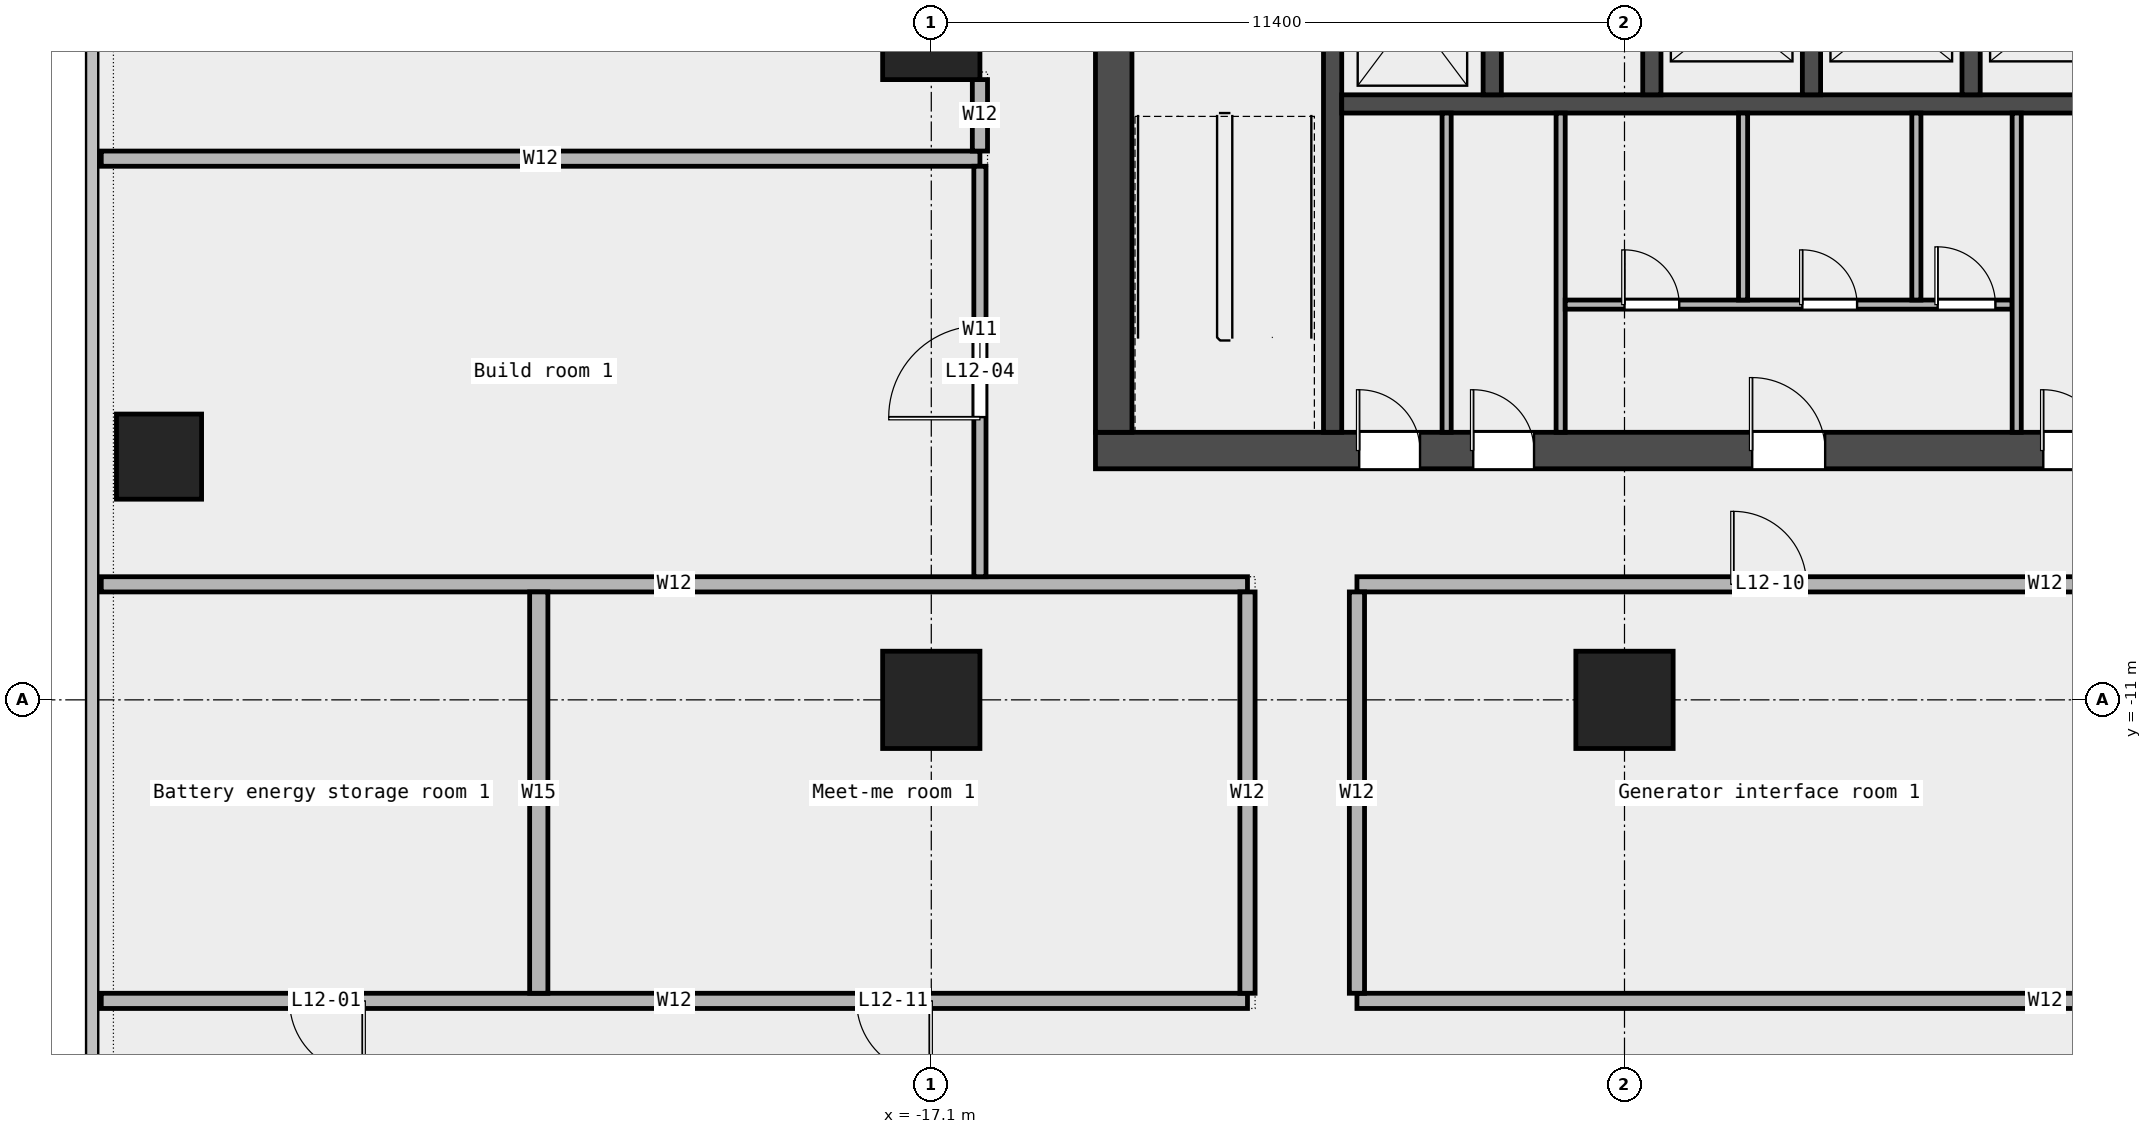
"""IFC4 building model, lengths in metres.
Left out: names, types, materials, properties, quantities, classifications, styles, units other than length and angle.
Written with IfcOpenShell. Run it as: python <this file> out.ifc"""

import sys

from ifc_helpers import new_model, si_unit, direction, frame, frame_2d, origin, origin_2d, place, context, subcontext, project, spatial, rectangle, extrude, element, fill, save


model = new_model("IFC4")
c1 = context("Model", 3, precision=1e-05, world=origin(), true_north=direction((0.0, 1.0)))
c2 = subcontext(c1, "Body", "Model", "MODEL_VIEW")
j1 = project(units=[si_unit("LENGTHUNIT", "METRE"), si_unit("PLANEANGLEUNIT", "RADIAN")], contexts=[c1])
p1 = place(None, origin())
s1 = spatial("IfcSite", under=j1, at=p1, CompositionType="ELEMENT")
p2 = place(p1, origin())
s2 = spatial("IfcBuilding", under=s1, at=p2, CompositionType="ELEMENT")
p3 = place(p2, frame((0.0, 0.0, 64.6)))
s3 = spatial("IfcBuildingStorey", under=s2, at=p3, CompositionType="ELEMENT", Elevation=64.6)
p4 = place(p3, frame((-29.8, -7.0, 0.0), z_axis=(0.0, 0.0, 1.0), x_axis=(1.0, 0.0, 0.0)))
e1 = element("IfcColumn", 1, at=p4, inside=s3, PredefinedType="COLUMN", context=c2, shape_type="SweptSolid", body=[
    extrude(rectangle(XDim=1.4, YDim=1.4, at=origin_2d()), origin(), (0.0, 0.0, 1.0), 4.35),
])
for number, where, z_axis, x_axis in (
    (2, (-17.1, -11.0, 0.0), (0.0, 0.0, 1.0), (1.0, 0.0, 0.0)),
    (3, (-17.1, 0.0, 0.0), (0.0, 0.0, 1.0), (1.0, 0.0, 0.0)),
    (4, (-5.7, -11.0, 0.0), (0.0, 0.0, 1.0), (1.0, 0.0, 0.0)),
):
    element("IfcColumn", number, at=place(p3, frame(where, z_axis=z_axis, x_axis=x_axis)), inside=s3, PredefinedType="COLUMN", context=c2, shape_type="SweptSolid", body=[
        extrude(rectangle(XDim=1.6, YDim=1.6, at=origin_2d()), origin(), (0.0, 0.0, 1.0), 4.35),
    ])
p5 = place(p3, frame((-30.75, -15.95, 0.0), z_axis=(0.0, 0.0, 1.0), x_axis=(1.0, 0.0, 0.0)))
e5 = element("IfcWall", 5, at=p5, inside=s3, PredefinedType="PARTITIONING", context=c2, shape_type="SweptSolid", body=[
    extrude(rectangle(XDim=18.85, YDim=0.25, at=frame_2d((9.425, 0.0))), origin(), (0.0, 0.0, 1.0), 4.35),
])
p6 = place(p5, frame((3.097, 0.0, 0.0)))
e6 = element("IfcOpeningElement", 6, at=p6, cuts=e5, PredefinedType="OPENING", context=c2, shape_type="SweptSolid", body=[
    extrude(rectangle(XDim=1.2, YDim=2.1, at=frame_2d((0.6, 1.05))), frame((0.0, 0.137, 0.0), z_axis=(0.0, -1.0, 0.0), x_axis=(1.0, 0.0, 0.0)), (0.0, 0.0, 1.0), 0.274),
])
p7 = place(p5, frame((12.423, 0.0, 0.0)))
e7 = element("IfcOpeningElement", 7, at=p7, cuts=e5, PredefinedType="OPENING", context=c2, shape_type="SweptSolid", body=[
    extrude(rectangle(XDim=1.2, YDim=2.1, at=frame_2d((0.6, 1.05))), frame((0.0, 0.137, 0.0), z_axis=(0.0, -1.0, 0.0), x_axis=(1.0, 0.0, 0.0)), (0.0, 0.0, 1.0), 0.274),
])
p8 = place(p3, frame((-10.1, -15.95, 0.0), z_axis=(0.0, 0.0, 1.0), x_axis=(1.0, 0.0, 0.0)))
e8 = element("IfcWall", 8, at=p8, inside=s3, PredefinedType="PARTITIONING", context=c2, shape_type="SweptSolid", body=[
    extrude(rectangle(XDim=22.64, YDim=0.25, at=frame_2d((11.32, 0.0))), origin(), (0.0, 0.0, 1.0), 4.35),
])
p9 = place(p3, frame((-30.75, -9.1, 0.0), z_axis=(0.0, 0.0, 1.0), x_axis=(1.0, 0.0, 0.0)))
e9 = element("IfcWall", 9, at=p9, inside=s3, PredefinedType="PARTITIONING", context=c2, shape_type="SweptSolid", body=[
    extrude(rectangle(XDim=18.85, YDim=0.25, at=frame_2d((9.425, 0.0))), origin(), (0.0, 0.0, 1.0), 4.35),
])
p10 = place(p3, frame((-10.1, -9.1, 0.0), z_axis=(0.0, 0.0, 1.0), x_axis=(1.0, 0.0, 0.0)))
e10 = element("IfcWall", 10, at=p10, inside=s3, PredefinedType="PARTITIONING", context=c2, shape_type="SweptSolid", body=[
    extrude(rectangle(XDim=22.64, YDim=0.25, at=frame_2d((11.32, 0.0))), origin(), (0.0, 0.0, 1.0), 4.35),
])
p11 = place(p10, frame((17.512, 0.0, 0.0)))
e11 = element("IfcOpeningElement", 11, at=p11, cuts=e10, PredefinedType="OPENING", context=c2, shape_type="SweptSolid", body=[
    extrude(rectangle(XDim=1.2, YDim=2.1, at=frame_2d((0.6, 1.05))), frame((0.0, 0.137, 0.0), z_axis=(0.0, -1.0, 0.0), x_axis=(1.0, 0.0, 0.0)), (0.0, 0.0, 1.0), 0.274),
])
p12 = place(p10, frame((6.192, 0.0, 0.0)))
e12 = element("IfcOpeningElement", 12, at=p12, cuts=e10, PredefinedType="OPENING", context=c2, shape_type="SweptSolid", body=[
    extrude(rectangle(XDim=1.2, YDim=2.1, at=frame_2d((0.6, 1.05))), frame((0.0, 0.137, 0.0), z_axis=(0.0, -1.0, 0.0), x_axis=(1.0, 0.0, 0.0)), (0.0, 0.0, 1.0), 0.274),
])
p13 = place(p3, frame((-30.75, -2.1, 0.0), z_axis=(0.0, 0.0, 1.0), x_axis=(1.0, 0.0, 0.0)))
e13 = element("IfcWall", 13, at=p13, inside=s3, PredefinedType="PARTITIONING", context=c2, shape_type="SweptSolid", body=[
    extrude(rectangle(XDim=14.45, YDim=0.25, at=frame_2d((7.225, 0.0))), origin(), (0.0, 0.0, 1.0), 4.35),
])
p14 = place(p3, frame((-23.555, -15.825, 0.0), z_axis=(0.0, 0.0, 1.0), x_axis=(0.0, 1.0, 0.0)))
e14 = element("IfcWall", 14, at=p14, inside=s3, PredefinedType="PARTITIONING", context=c2, shape_type="SweptSolid", body=[
    extrude(rectangle(XDim=6.6, YDim=0.3, at=frame_2d((3.3, 0.0))), origin(), (0.0, 0.0, 1.0), 4.35),
])
p15 = place(p3, frame((-16.3, -8.975, 0.0), z_axis=(0.0, 0.0, 1.0), x_axis=(0.0, 1.0, 0.0)))
e15 = element("IfcWall", 15, at=p15, inside=s3, PredefinedType="PARTITIONING", context=c2, shape_type="SweptSolid", body=[
    extrude(rectangle(XDim=6.75, YDim=0.2, at=frame_2d((3.375, 0.0))), origin(), (0.0, 0.0, 1.0), 4.35),
])
p16 = place(p15, frame((2.625, 0.0, 0.0)))
e16 = element("IfcOpeningElement", 16, at=p16, cuts=e15, PredefinedType="OPENING", context=c2, shape_type="SweptSolid", body=[
    extrude(rectangle(XDim=1.5, YDim=2.1, at=frame_2d((0.75, 1.05))), frame((0.0, 0.112, 0.0), z_axis=(0.0, -1.0, 0.0), x_axis=(1.0, 0.0, 0.0)), (0.0, 0.0, 1.0), 0.224),
])
p17 = place(p3, frame((-16.3, -1.975, 0.0), z_axis=(0.0, 0.0, 1.0), x_axis=(0.0, 1.0, 0.0)))
e17 = element("IfcWall", 17, at=p17, inside=s3, PredefinedType="PARTITIONING", context=c2, shape_type="SweptSolid", body=[
    extrude(rectangle(XDim=1.175, YDim=0.25, at=frame_2d((0.587, 0.0))), origin(), (0.0, 0.0, 1.0), 4.35),
])
for number, where, z_axis, x_axis in (
    (18, (-11.9, -15.825, 0.0), (0.0, 0.0, 1.0), (0.0, 1.0, 0.0)),
    (19, (-10.1, -15.825, 0.0), (0.0, 0.0, 1.0), (0.0, 1.0, 0.0)),
):
    element("IfcWall", number, at=place(p3, frame(where, z_axis=z_axis, x_axis=x_axis)), inside=s3, PredefinedType="PARTITIONING", context=c2, shape_type="SweptSolid", body=[
        extrude(rectangle(XDim=6.6, YDim=0.25, at=frame_2d((3.3, 0.0))), origin(), (0.0, 0.0, 1.0), 4.35),
    ])
p18 = place(p3, frame((-14.4, -6.9, 0.0), z_axis=(0.0, 0.0, 1.0), x_axis=(1.0, 0.0, 0.0)))
e20 = element("IfcWall", 20, at=p18, inside=s3, PredefinedType="SHEAR", context=c2, shape_type="SweptSolid", body=[
    extrude(rectangle(XDim=28.8, YDim=0.6, at=frame_2d((14.4, 0.0))), origin(), (0.0, 0.0, 1.0), 4.5),
])
p19 = place(p18, frame((4.337, 0.0, 0.0)))
e21 = element("IfcOpeningElement", 21, at=p19, cuts=e20, PredefinedType="OPENING", context=c2, shape_type="SweptSolid", body=[
    extrude(rectangle(XDim=1.0, YDim=2.1, at=frame_2d((0.5, 1.05))), frame((0.0, 0.312, 0.0), z_axis=(0.0, -1.0, 0.0), x_axis=(1.0, 0.0, 0.0)), (0.0, 0.0, 1.0), 0.624),
])
p20 = place(p18, frame((6.212, 0.0, 0.0)))
e22 = element("IfcOpeningElement", 22, at=p20, cuts=e20, PredefinedType="OPENING", context=c2, shape_type="SweptSolid", body=[
    extrude(rectangle(XDim=1.0, YDim=2.1, at=frame_2d((0.5, 1.05))), frame((0.0, 0.312, 0.0), z_axis=(0.0, -1.0, 0.0), x_axis=(1.0, 0.0, 0.0)), (0.0, 0.0, 1.0), 0.624),
])
p21 = place(p18, frame((10.8, 0.0, 0.0)))
e23 = element("IfcOpeningElement", 23, at=p21, cuts=e20, PredefinedType="OPENING", context=c2, shape_type="SweptSolid", body=[
    extrude(rectangle(XDim=1.2, YDim=2.1, at=frame_2d((0.6, 1.05))), frame((0.0, 0.312, 0.0), z_axis=(0.0, -1.0, 0.0), x_axis=(1.0, 0.0, 0.0)), (0.0, 0.0, 1.0), 0.624),
])
p22 = place(p18, frame((15.587, 0.0, 0.0)))
e24 = element("IfcOpeningElement", 24, at=p22, cuts=e20, PredefinedType="OPENING", context=c2, shape_type="SweptSolid", body=[
    extrude(rectangle(XDim=1.0, YDim=2.1, at=frame_2d((0.5, 1.05))), frame((0.0, 0.312, 0.0), z_axis=(0.0, -1.0, 0.0), x_axis=(1.0, 0.0, 0.0)), (0.0, 0.0, 1.0), 0.624),
])
p23 = place(p18, frame((18.75, 0.0, 0.0)))
e25 = element("IfcOpeningElement", 25, at=p23, cuts=e20, PredefinedType="OPENING", context=c2, shape_type="SweptSolid", body=[
    extrude(rectangle(XDim=1.8, YDim=2.1, at=frame_2d((0.9, 1.05))), frame((0.0, 0.312, 0.0), z_axis=(0.0, -1.0, 0.0), x_axis=(1.0, 0.0, 0.0)), (0.0, 0.0, 1.0), 0.624),
])
p24 = place(p18, frame((23.087, 0.0, 0.0)))
e26 = element("IfcOpeningElement", 26, at=p24, cuts=e20, PredefinedType="OPENING", context=c2, shape_type="SweptSolid", body=[
    extrude(rectangle(XDim=1.0, YDim=2.1, at=frame_2d((0.5, 1.05))), frame((0.0, 0.312, 0.0), z_axis=(0.0, -1.0, 0.0), x_axis=(1.0, 0.0, 0.0)), (0.0, 0.0, 1.0), 0.624),
])
p25 = place(p3, frame((-14.1, -6.6, 0.0), z_axis=(0.0, 0.0, 1.0), x_axis=(0.0, 1.0, 0.0)))
e27 = element("IfcWall", 27, at=p25, inside=s3, PredefinedType="SHEAR", context=c2, shape_type="SweptSolid", body=[
    extrude(rectangle(XDim=19.5, YDim=0.6, at=frame_2d((9.75, 0.0))), origin(), (0.0, 0.0, 1.0), 4.5),
])
p26 = place(p25, frame((9.3, 0.0, 0.0)))
e28 = element("IfcOpeningElement", 28, at=p26, cuts=e27, PredefinedType="OPENING", context=c2, shape_type="SweptSolid", body=[
    extrude(rectangle(XDim=1.8, YDim=2.1, at=frame_2d((0.9, 1.05))), frame((0.0, 0.312, 0.0), z_axis=(0.0, -1.0, 0.0), x_axis=(1.0, 0.0, 0.0)), (0.0, 0.0, 1.0), 0.624),
])
p27 = place(p3, frame((-10.5, -6.6, 0.0), z_axis=(0.0, 0.0, 1.0), x_axis=(0.0, 1.0, 0.0)))
e29 = element("IfcWall", 29, at=p27, inside=s3, PredefinedType="SHEAR", context=c2, shape_type="SweptSolid", body=[
    extrude(rectangle(XDim=8.55, YDim=0.3, at=frame_2d((4.275, 0.0))), origin(), (0.0, 0.0, 1.0), 4.5),
])
p28 = place(p3, frame((-10.35, -1.2, 0.0), z_axis=(0.0, 0.0, 1.0), x_axis=(1.0, 0.0, 0.0)))
e30 = element("IfcWall", 30, at=p28, inside=s3, PredefinedType="SOLIDWALL", context=c2, shape_type="SweptSolid", body=[
    extrude(rectangle(XDim=20.7, YDim=0.3, at=frame_2d((10.35, 0.0))), origin(), (0.0, 0.0, 1.0), 4.5),
])
for number, where, z_axis, x_axis in (
    (31, (-7.875, -1.05, 0.0), (0.0, 0.0, 1.0), (0.0, 1.0, 0.0)),
    (32, (-5.25, -1.05, 0.0), (0.0, 0.0, 1.0), (0.0, 1.0, 0.0)),
    (33, (-2.625, -1.05, 0.0), (0.0, 0.0, 1.0), (0.0, 1.0, 0.0)),
    (34, (0.0, -1.05, 0.0), (0.0, 0.0, 1.0), (0.0, 1.0, 0.0)),
):
    element("IfcWall", number, at=place(p3, frame(where, z_axis=z_axis, x_axis=x_axis)), inside=s3, PredefinedType="SOLIDWALL", context=c2, shape_type="SweptSolid", body=[
        extrude(rectangle(XDim=2.7, YDim=0.3, at=frame_2d((1.35, 0.0))), origin(), (0.0, 0.0, 1.0), 4.5),
    ])
for number, where, z_axis, x_axis in (
    (35, (-8.625, -6.6, 0.0), (0.0, 0.0, 1.0), (0.0, 1.0, 0.0)),
    (36, (-6.75, -6.6, 0.0), (0.0, 0.0, 1.0), (0.0, 1.0, 0.0)),
):
    element("IfcWall", number, at=place(p3, frame(where, z_axis=z_axis, x_axis=x_axis)), inside=s3, PredefinedType="PARTITIONING", context=c2, shape_type="SweptSolid", body=[
        extrude(rectangle(XDim=5.25, YDim=0.15, at=frame_2d((2.625, 0.0))), origin(), (0.0, 0.0, 1.0), 4.5),
    ])
p29 = place(p3, frame((-6.675, -4.5, 0.0), z_axis=(0.0, 0.0, 1.0), x_axis=(1.0, 0.0, 0.0)))
e37 = element("IfcWall", 37, at=p29, inside=s3, PredefinedType="PARTITIONING", context=c2, shape_type="SweptSolid", body=[
    extrude(rectangle(XDim=7.35, YDim=0.15, at=frame_2d((3.675, 0.0))), origin(), (0.0, 0.0, 1.0), 4.5),
])
p30 = place(p29, frame((0.975, 0.0, 0.0)))
e38 = element("IfcOpeningElement", 38, at=p30, cuts=e37, PredefinedType="OPENING", context=c2, shape_type="SweptSolid", body=[
    extrude(rectangle(XDim=0.9, YDim=2.1, at=frame_2d((0.45, 1.05))), frame((0.0, 0.087, 0.0), z_axis=(0.0, -1.0, 0.0), x_axis=(1.0, 0.0, 0.0)), (0.0, 0.0, 1.0), 0.174),
])
p31 = place(p29, frame((3.9, 0.0, 0.0)))
e39 = element("IfcOpeningElement", 39, at=p31, cuts=e37, PredefinedType="OPENING", context=c2, shape_type="SweptSolid", body=[
    extrude(rectangle(XDim=0.9, YDim=2.1, at=frame_2d((0.45, 1.05))), frame((0.0, 0.087, 0.0), z_axis=(0.0, -1.0, 0.0), x_axis=(1.0, 0.0, 0.0)), (0.0, 0.0, 1.0), 0.174),
])
p32 = place(p29, frame((6.125, 0.0, 0.0)))
e40 = element("IfcOpeningElement", 40, at=p32, cuts=e37, PredefinedType="OPENING", context=c2, shape_type="SweptSolid", body=[
    extrude(rectangle(XDim=0.95, YDim=2.1, at=frame_2d((0.475, 1.05))), frame((0.0, 0.087, 0.0), z_axis=(0.0, -1.0, 0.0), x_axis=(1.0, 0.0, 0.0)), (0.0, 0.0, 1.0), 0.174),
])
for number, where, z_axis, x_axis in (
    (41, (-3.75, -4.425, 0.0), (0.0, 0.0, 1.0), (0.0, 1.0, 0.0)),
    (42, (-0.9, -4.425, 0.0), (0.0, 0.0, 1.0), (0.0, 1.0, 0.0)),
):
    element("IfcWall", number, at=place(p3, frame(where, z_axis=z_axis, x_axis=x_axis)), inside=s3, PredefinedType="PARTITIONING", context=c2, shape_type="SweptSolid", body=[
        extrude(rectangle(XDim=3.075, YDim=0.15, at=frame_2d((1.538, 0.0))), origin(), (0.0, 0.0, 1.0), 4.5),
    ])
p33 = place(p3, frame((0.75, -6.6, 0.0), z_axis=(0.0, 0.0, 1.0), x_axis=(0.0, 1.0, 0.0)))
e43 = element("IfcWall", 43, at=p33, inside=s3, PredefinedType="PARTITIONING", context=c2, shape_type="SweptSolid", body=[
    extrude(rectangle(XDim=5.25, YDim=0.15, at=frame_2d((2.625, 0.0))), origin(), (0.0, 0.0, 1.0), 4.5),
])
p34 = place(p6, origin())
e44 = element("IfcDoor", 44, at=p34, inside=s3, OperationType="SINGLE_SWING_LEFT", PredefinedType="DOOR", context=c2, shape_type="SweptSolid", body=[
    extrude(rectangle(XDim=1.2, YDim=2.1, at=frame_2d((0.6, 1.05))), frame((0.0, 0.025, 0.0), z_axis=(0.0, -1.0, 0.0), x_axis=(1.0, 0.0, 0.0)), (0.0, 0.0, 1.0), 0.05),
])
fill(e6, e44)
p35 = place(p16, origin())
e45 = element("IfcDoor", 45, at=p35, inside=s3, OperationType="DOUBLE_DOOR_SINGLE_SWING", PredefinedType="DOOR", context=c2, shape_type="SweptSolid", body=[
    extrude(rectangle(XDim=1.5, YDim=2.1, at=frame_2d((0.75, 1.05))), frame((0.0, 0.025, 0.0), z_axis=(0.0, -1.0, 0.0), x_axis=(1.0, 0.0, 0.0)), (0.0, 0.0, 1.0), 0.05),
])
fill(e16, e45)
p36 = place(p12, origin())
e46 = element("IfcDoor", 46, at=p36, inside=s3, OperationType="SINGLE_SWING_LEFT", PredefinedType="DOOR", context=c2, shape_type="SweptSolid", body=[
    extrude(rectangle(XDim=1.2, YDim=2.1, at=frame_2d((0.6, 1.05))), frame((0.0, 0.025, 0.0), z_axis=(0.0, -1.0, 0.0), x_axis=(1.0, 0.0, 0.0)), (0.0, 0.0, 1.0), 0.05),
])
fill(e12, e46)
p37 = place(p7, origin())
e47 = element("IfcDoor", 47, at=p37, inside=s3, OperationType="SINGLE_SWING_LEFT", PredefinedType="DOOR", context=c2, shape_type="SweptSolid", body=[
    extrude(rectangle(XDim=1.2, YDim=2.1, at=frame_2d((0.6, 1.05))), frame((0.0, 0.025, 0.0), z_axis=(0.0, -1.0, 0.0), x_axis=(1.0, 0.0, 0.0)), (0.0, 0.0, 1.0), 0.05),
])
fill(e7, e47)
p38 = place(p19, origin())
e48 = element("IfcDoor", 48, at=p38, inside=s3, OperationType="SINGLE_SWING_LEFT", PredefinedType="DOOR", context=c2, shape_type="SweptSolid", body=[
    extrude(rectangle(XDim=1.0, YDim=2.1, at=frame_2d((0.5, 1.05))), frame((0.0, 0.025, 0.0), z_axis=(0.0, -1.0, 0.0), x_axis=(1.0, 0.0, 0.0)), (0.0, 0.0, 1.0), 0.05),
])
fill(e21, e48)
p39 = place(p20, origin())
e49 = element("IfcDoor", 49, at=p39, inside=s3, OperationType="SINGLE_SWING_LEFT", PredefinedType="DOOR", context=c2, shape_type="SweptSolid", body=[
    extrude(rectangle(XDim=1.0, YDim=2.1, at=frame_2d((0.5, 1.05))), frame((0.0, 0.025, 0.0), z_axis=(0.0, -1.0, 0.0), x_axis=(1.0, 0.0, 0.0)), (0.0, 0.0, 1.0), 0.05),
])
fill(e22, e49)
p40 = place(p21, origin())
e50 = element("IfcDoor", 50, at=p40, inside=s3, OperationType="SINGLE_SWING_LEFT", PredefinedType="DOOR", context=c2, shape_type="SweptSolid", body=[
    extrude(rectangle(XDim=1.2, YDim=2.1, at=frame_2d((0.6, 1.05))), frame((0.0, 0.025, 0.0), z_axis=(0.0, -1.0, 0.0), x_axis=(1.0, 0.0, 0.0)), (0.0, 0.0, 1.0), 0.05),
])
fill(e23, e50)
p41 = place(p30, origin())
e51 = element("IfcDoor", 51, at=p41, inside=s3, OperationType="SINGLE_SWING_LEFT", PredefinedType="DOOR", context=c2, shape_type="SweptSolid", body=[
    extrude(rectangle(XDim=0.9, YDim=2.1, at=frame_2d((0.45, 1.05))), frame((0.0, 0.025, 0.0), z_axis=(0.0, -1.0, 0.0), x_axis=(1.0, 0.0, 0.0)), (0.0, 0.0, 1.0), 0.05),
])
fill(e38, e51)
p42 = place(p31, origin())
e52 = element("IfcDoor", 52, at=p42, inside=s3, OperationType="SINGLE_SWING_LEFT", PredefinedType="DOOR", context=c2, shape_type="SweptSolid", body=[
    extrude(rectangle(XDim=0.9, YDim=2.1, at=frame_2d((0.45, 1.05))), frame((0.0, 0.025, 0.0), z_axis=(0.0, -1.0, 0.0), x_axis=(1.0, 0.0, 0.0)), (0.0, 0.0, 1.0), 0.05),
])
fill(e39, e52)
p43 = place(p32, origin())
e53 = element("IfcDoor", 53, at=p43, inside=s3, OperationType="SINGLE_SWING_LEFT", PredefinedType="DOOR", context=c2, shape_type="SweptSolid", body=[
    extrude(rectangle(XDim=0.95, YDim=2.1, at=frame_2d((0.475, 1.05))), frame((0.0, 0.025, 0.0), z_axis=(0.0, -1.0, 0.0), x_axis=(1.0, 0.0, 0.0)), (0.0, 0.0, 1.0), 0.05),
])
fill(e40, e53)
p44 = place(p22, origin())
e54 = element("IfcDoor", 54, at=p44, inside=s3, OperationType="SINGLE_SWING_LEFT", PredefinedType="DOOR", context=c2, shape_type="SweptSolid", body=[
    extrude(rectangle(XDim=1.0, YDim=2.1, at=frame_2d((0.5, 1.05))), frame((0.0, 0.025, 0.0), z_axis=(0.0, -1.0, 0.0), x_axis=(1.0, 0.0, 0.0)), (0.0, 0.0, 1.0), 0.05),
])
fill(e24, e54)
save(model, sys.argv[1])
